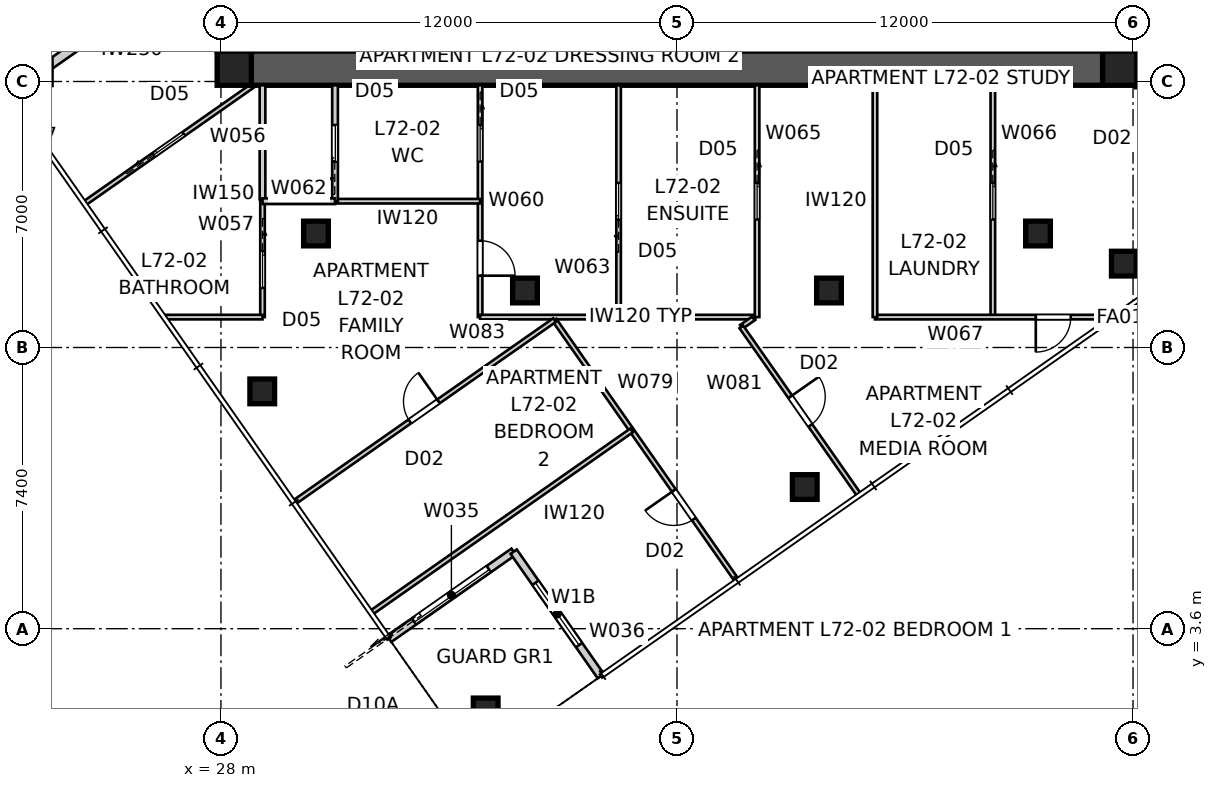
"""IFC4 building model, lengths in metres.
Left out: names, types, materials, properties, quantities, classifications, styles, units other than length and angle.
Written with IfcOpenShell. Run it as: python <this file> out.ifc"""

import sys

from ifc_helpers import new_model, si_unit, direction, frame, frame_2d, origin, origin_2d, place, context, subcontext, project, spatial, polyline, rectangle, outline, extrude, element, fill, save


model = new_model("IFC4")
c1 = context("Model", 3, precision=1e-05, world=origin(), true_north=direction((0.0, 1.0)))
c2 = subcontext(c1, "Body", "Model", "MODEL_VIEW")
j1 = project(units=[si_unit("LENGTHUNIT", "METRE"), si_unit("PLANEANGLEUNIT", "RADIAN")], contexts=[c1])
p1 = place(None, origin())
s1 = spatial("IfcSite", under=j1, at=p1, CompositionType="ELEMENT")
p2 = place(p1, origin())
s2 = spatial("IfcBuilding", under=s1, at=p2, CompositionType="ELEMENT")
p3 = place(p2, frame((0.0, 0.0, 260.8)))
s3 = spatial("IfcBuildingStorey", under=s2, at=p3, CompositionType="ELEMENT", Elevation=260.8)
p4 = place(p3, frame((51.2, 18.35, 0.0), z_axis=(0.0, 0.0, 1.0), x_axis=(-1.0, 0.0, 0.0)))
e1 = element("IfcWall", 1, at=p4, inside=s3, PredefinedType="SHEAR", context=c2, shape_type="SweptSolid", body=[
    extrude(outline(polyline([(0.0, -0.45), (22.4, -0.45), (22.4, -0.025), (22.85, -0.025), (22.85, 0.025), (22.4, 0.025), (22.4, 0.45), (0.0, 0.45), (0.0, 0.025), (-0.45, 0.025), (-0.45, -0.025), (0.0, -0.025), (0.0, -0.45)])), origin(), (0.0, 0.0, 1.0), 3.4),
])
p5 = place(p3, frame((51.65, 18.8, 0.0), z_axis=(0.0, 0.0, 1.0), x_axis=(0.0, 1.0, 0.0)))
e2 = element("IfcWall", 2, at=p5, inside=s3, PredefinedType="SHEAR", context=c2, shape_type="SweptSolid", body=[
    extrude(outline(polyline([(0.0, -0.45), (22.4, -0.45), (22.4, -0.025), (22.85, -0.025), (22.85, 0.025), (22.4, 0.025), (22.4, 0.45), (0.0, 0.45), (0.0, 0.025), (-0.45, 0.025), (-0.45, -0.025), (0.0, -0.025), (0.0, -0.45)])), origin(), (0.0, 0.0, 1.0), 3.4),
])
p6 = place(p5, frame((11.14, 0.0, 0.0)))
e3 = element("IfcOpeningElement", 3, at=p6, cuts=e2, PredefinedType="OPENING", context=c2, shape_type="SweptSolid", body=[
    extrude(rectangle(XDim=1.02, YDim=2.4, at=frame_2d((0.51, 1.2))), frame((0.0, 0.46, 0.0), z_axis=(0.0, -1.0, 0.0), x_axis=(1.0, 0.0, 0.0)), (0.0, 0.0, 1.0), 0.92),
])
p7 = place(p3, frame((28.35, 41.2, 0.0), z_axis=(0.0, 0.0, 1.0), x_axis=(0.0, -1.0, 0.0)))
e4 = element("IfcWall", 4, at=p7, inside=s3, PredefinedType="SHEAR", context=c2, shape_type="SweptSolid", body=[
    extrude(outline(polyline([(0.0, -0.45), (22.4, -0.45), (22.4, -0.025), (22.85, -0.025), (22.85, 0.025), (22.4, 0.025), (22.4, 0.45), (0.0, 0.45), (0.0, 0.025), (-0.45, 0.025), (-0.45, -0.025), (0.0, -0.025), (0.0, -0.45)])), origin(), (0.0, 0.0, 1.0), 3.4),
])
p8 = place(p7, frame((11.14, 0.0, 0.0)))
e5 = element("IfcOpeningElement", 5, at=p8, cuts=e4, PredefinedType="OPENING", context=c2, shape_type="SweptSolid", body=[
    extrude(rectangle(XDim=1.02, YDim=2.4, at=frame_2d((0.51, 1.2))), frame((0.0, 0.46, 0.0), z_axis=(0.0, -1.0, 0.0), x_axis=(1.0, 0.0, 0.0)), (0.0, 0.0, 1.0), 0.92),
])
for number, where, z_axis, x_axis in (
    (6, (28.35, 18.35, 0.0), (0.0, 0.0, 1.0), (1.0, 0.0, 0.0)),
    (7, (51.65, 18.35, 0.0), (0.0, 0.0, 1.0), (1.0, 0.0, 0.0)),
):
    element("IfcColumn", number, at=place(p3, frame(where, z_axis=z_axis, x_axis=x_axis)), inside=s3, PredefinedType="COLUMN", context=c2, shape_type="SweptSolid", body=[
        extrude(rectangle(XDim=0.9, YDim=0.9, at=origin_2d()), origin(), (0.0, 0.0, 1.0), 3.4),
    ])
for number, where, z_axis, x_axis in (
    (8, (34.966, 1.449, 0.0), (0.0, 0.0, 1.0), (1.0, 0.0, 0.0)),
    (9, (43.362, 7.328, 0.0), (0.0, 0.0, 1.0), (1.0, 0.0, 0.0)),
    (10, (51.758, 13.207, 0.0), (0.0, 0.0, 1.0), (1.0, 0.0, 0.0)),
    (11, (29.086, 9.845, 0.0), (0.0, 0.0, 1.0), (1.0, 0.0, 0.0)),
    (12, (30.5, 14.0, 0.0), (0.0, 0.0, 1.0), (1.0, 0.0, 0.0)),
    (13, (36.0, 12.5, 0.0), (0.0, 0.0, 1.0), (1.0, 0.0, 0.0)),
    (14, (44.0, 12.5, 0.0), (0.0, 0.0, 1.0), (1.0, 0.0, 0.0)),
    (15, (49.5, 14.0, 0.0), (0.0, 0.0, 1.0), (1.0, 0.0, 0.0)),
):
    element("IfcColumn", number, at=place(p3, frame(where, z_axis=z_axis, x_axis=x_axis)), inside=s3, PredefinedType="COLUMN", context=c2, shape_type="SweptSolid", body=[
        extrude(rectangle(XDim=0.65, YDim=0.65, at=origin_2d()), origin(), (0.0, 0.0, 1.0), 3.4),
    ])
p9 = place(p3, frame((32.426, 3.333, 0.0), z_axis=(0.0, 0.0, 1.0), x_axis=(0.819165963305, 0.573556557423, 0.0)))
e16 = element("IfcWall", 16, at=p9, inside=s3, PredefinedType="SOLIDWALL", context=c2, shape_type="SweptSolid", body=[
    extrude(rectangle(XDim=4.0, YDim=0.2, at=frame_2d((2.0, 0.0))), origin(), (0.0, 0.0, 1.0), 3.25),
])
p10 = place(p9, frame((0.8, 0.0, 0.0)))
e17 = element("IfcOpeningElement", 17, at=p10, cuts=e16, PredefinedType="OPENING", context=c2, shape_type="SweptSolid", body=[
    extrude(rectangle(XDim=2.4, YDim=2.1, at=frame_2d((1.2, 1.05))), frame((0.0, 0.11, 0.0), z_axis=(0.0, -1.0, 0.0), x_axis=(1.0, 0.0, 0.0)), (0.0, 0.0, 1.0), 0.22),
])
p11 = place(p3, frame((35.702, 5.627, 0.0), z_axis=(0.0, 0.0, 1.0), x_axis=(0.573597512525, -0.819137286189, 0.0)))
e18 = element("IfcWall", 18, at=p11, inside=s3, PredefinedType="SOLIDWALL", context=c2, shape_type="SweptSolid", body=[
    extrude(rectangle(XDim=4.0, YDim=0.2, at=frame_2d((2.0, 0.0))), origin(), (0.0, 0.0, 1.0), 3.25),
])
p12 = place(p11, frame((1.0, 0.0, 0.45)))
e19 = element("IfcOpeningElement", 19, at=p12, cuts=e18, PredefinedType="OPENING", context=c2, shape_type="SweptSolid", body=[
    extrude(rectangle(XDim=2.0, YDim=1.8, at=frame_2d((1.0, 0.9))), frame((0.0, 0.11, 0.0), z_axis=(0.0, -1.0, 0.0), x_axis=(1.0, 0.0, 0.0)), (0.0, 0.0, 1.0), 0.22),
])
p13 = place(p3, frame((22.388, 17.668, 0.0), z_axis=(0.0, 0.0, 1.0), x_axis=(0.819161528122, 0.573562891796, 0.0)))
e20 = element("IfcWall", 20, at=p13, inside=s3, PredefinedType="PARTITIONING", context=c2, shape_type="SweptSolid", body=[
    extrude(rectangle(XDim=6.681, YDim=0.25, at=frame_2d((3.341, 0.0))), origin(), (0.0, 0.0, 1.0), 3.25),
])
p14 = place(p3, frame((24.437, 14.812, 0.0), z_axis=(0.0, 0.0, 1.0), x_axis=(0.819157353031, 0.573568854608, 0.0)))
e21 = element("IfcWall", 21, at=p14, inside=s3, PredefinedType="PARTITIONING", context=c2, shape_type="SweptSolid", body=[
    extrude(rectangle(XDim=5.384, YDim=0.12, at=frame_2d((2.692, 0.0))), origin(), (0.0, 0.0, 1.0), 3.25),
])
p15 = place(p14, frame((2.192, 0.0, 0.0)))
e22 = element("IfcOpeningElement", 22, at=p15, cuts=e21, PredefinedType="OPENING", context=c2, shape_type="SweptSolid", body=[
    extrude(rectangle(XDim=0.96, YDim=2.1, at=frame_2d((0.48, 1.05))), frame((0.0, 0.07, 0.0), z_axis=(0.0, -1.0, 0.0), x_axis=(1.0, 0.0, 0.0)), (0.0, 0.0, 1.0), 0.14),
])
p16 = place(p3, frame((29.094, 14.9, 0.0), z_axis=(0.0, 0.0, 1.0), x_axis=(0.0, -1.0, 0.0)))
e23 = element("IfcWall", 23, at=p16, inside=s3, PredefinedType="PARTITIONING", context=c2, shape_type="SweptSolid", body=[
    extrude(rectangle(XDim=3.1, YDim=0.12, at=frame_2d((1.55, 0.0))), origin(), (0.0, 0.0, 1.0), 3.25),
])
p17 = place(p16, frame((1.37, 0.0, 0.0)))
e24 = element("IfcOpeningElement", 24, at=p17, cuts=e23, PredefinedType="OPENING", context=c2, shape_type="SweptSolid", body=[
    extrude(rectangle(XDim=0.96, YDim=2.1, at=frame_2d((0.48, 1.05))), frame((0.0, 0.07, 0.0), z_axis=(0.0, -1.0, 0.0), x_axis=(1.0, 0.0, 0.0)), (0.0, 0.0, 1.0), 0.14),
])
p18 = place(p3, frame((29.094, 11.8, 0.0), z_axis=(0.0, 0.0, 1.0), x_axis=(-1.0, 0.0, 0.0)))
e25 = element("IfcWall", 25, at=p18, inside=s3, PredefinedType="PARTITIONING", context=c2, shape_type="SweptSolid", body=[
    extrude(rectangle(XDim=2.548, YDim=0.12, at=frame_2d((1.274, 0.0))), origin(), (0.0, 0.0, 1.0), 3.25),
])
p19 = place(p3, frame((29.094, 17.9, 0.0), z_axis=(0.0, 0.0, 1.0), x_axis=(0.0, -1.0, 0.0)))
e26 = element("IfcWall", 26, at=p19, inside=s3, PredefinedType="SOLIDWALL", context=c2, shape_type="SweptSolid", body=[
    extrude(rectangle(XDim=3.0, YDim=0.15, at=frame_2d((1.5, 0.0))), origin(), (0.0, 0.0, 1.0), 3.25),
])
p20 = place(p3, frame((34.819, 17.9, 0.0), z_axis=(0.0, 0.0, 1.0), x_axis=(0.0, -1.0, 0.0)))
e27 = element("IfcWall", 27, at=p20, inside=s3, PredefinedType="PARTITIONING", context=c2, shape_type="SweptSolid", body=[
    extrude(rectangle(XDim=6.1, YDim=0.12, at=frame_2d((3.05, 0.0))), origin(), (0.0, 0.0, 1.0), 3.25),
])
p21 = place(p20, frame((4.09, 0.0, 0.0)))
e28 = element("IfcOpeningElement", 28, at=p21, cuts=e27, PredefinedType="OPENING", context=c2, shape_type="SweptSolid", body=[
    extrude(rectangle(XDim=0.92, YDim=2.34, at=frame_2d((0.46, 1.17))), frame((0.0, 0.07, 0.0), z_axis=(0.0, -1.0, 0.0), x_axis=(1.0, 0.0, 0.0)), (0.0, 0.0, 1.0), 0.14),
])
p22 = place(p20, frame((1.045, 0.0, 0.0)))
e29 = element("IfcOpeningElement", 29, at=p22, cuts=e27, PredefinedType="OPENING", context=c2, shape_type="SweptSolid", body=[
    extrude(rectangle(XDim=0.96, YDim=2.1, at=frame_2d((0.48, 1.05))), frame((0.0, 0.07, 0.0), z_axis=(0.0, -1.0, 0.0), x_axis=(1.0, 0.0, 0.0)), (0.0, 0.0, 1.0), 0.14),
])
p23 = place(p3, frame((34.819, 14.85, 0.0), z_axis=(0.0, 0.0, 1.0), x_axis=(-1.0, 0.0, 0.0)))
e30 = element("IfcWall", 30, at=p23, inside=s3, PredefinedType="PARTITIONING", context=c2, shape_type="SweptSolid", body=[
    extrude(rectangle(XDim=3.817, YDim=0.12, at=frame_2d((1.909, 0.0))), origin(), (0.0, 0.0, 1.0), 3.25),
])
p24 = place(p3, frame((31.002, 14.85, 0.0), z_axis=(0.0, 0.0, 1.0), x_axis=(0.0, 1.0, 0.0)))
e31 = element("IfcWall", 31, at=p24, inside=s3, PredefinedType="SOLIDWALL", context=c2, shape_type="SweptSolid", body=[
    extrude(rectangle(XDim=3.05, YDim=0.15, at=frame_2d((1.525, 0.0))), origin(), (0.0, 0.0, 1.0), 3.25),
])
p25 = place(p24, frame((1.045, 0.0, 0.0)))
e32 = element("IfcOpeningElement", 32, at=p25, cuts=e31, PredefinedType="OPENING", context=c2, shape_type="SweptSolid", body=[
    extrude(rectangle(XDim=0.96, YDim=2.1, at=frame_2d((0.48, 1.05))), frame((0.0, 0.085, 0.0), z_axis=(0.0, -1.0, 0.0), x_axis=(1.0, 0.0, 0.0)), (0.0, 0.0, 1.0), 0.17),
])
p26 = place(p3, frame((38.464, 11.8, 0.0), z_axis=(0.0, 0.0, 1.0), x_axis=(0.0, 1.0, 0.0)))
e33 = element("IfcWall", 33, at=p26, inside=s3, PredefinedType="PARTITIONING", context=c2, shape_type="SweptSolid", body=[
    extrude(rectangle(XDim=6.1, YDim=0.12, at=frame_2d((3.05, 0.0))), origin(), (0.0, 0.0, 1.0), 3.25),
])
p27 = place(p26, frame((2.57, 0.0, 0.0)))
e34 = element("IfcOpeningElement", 34, at=p27, cuts=e33, PredefinedType="OPENING", context=c2, shape_type="SweptSolid", body=[
    extrude(rectangle(XDim=0.96, YDim=2.1, at=frame_2d((0.48, 1.05))), frame((0.0, 0.07, 0.0), z_axis=(0.0, -1.0, 0.0), x_axis=(1.0, 0.0, 0.0)), (0.0, 0.0, 1.0), 0.14),
])
p28 = place(p3, frame((42.062, 11.8, 0.0), z_axis=(0.0, 0.0, 1.0), x_axis=(-1.0, 0.0, 0.0)))
e35 = element("IfcWall", 35, at=p28, inside=s3, PredefinedType="PARTITIONING", context=c2, shape_type="SweptSolid", body=[
    extrude(rectangle(XDim=7.243, YDim=0.12, at=frame_2d((3.621, 0.0))), origin(), (0.0, 0.0, 1.0), 3.25),
])
p29 = place(p3, frame((42.108, 17.9, 0.0), z_axis=(0.0, 0.0, 1.0), x_axis=(0.0, -1.0, 0.0)))
e36 = element("IfcWall", 36, at=p29, inside=s3, PredefinedType="PARTITIONING", context=c2, shape_type="SweptSolid", body=[
    extrude(rectangle(XDim=6.1, YDim=0.12, at=frame_2d((3.05, 0.0))), origin(), (0.0, 0.0, 1.0), 3.25),
])
p30 = place(p29, frame((2.57, 0.0, 0.0)))
e37 = element("IfcOpeningElement", 37, at=p30, cuts=e36, PredefinedType="OPENING", context=c2, shape_type="SweptSolid", body=[
    extrude(rectangle(XDim=0.96, YDim=2.1, at=frame_2d((0.48, 1.05))), frame((0.0, 0.07, 0.0), z_axis=(0.0, -1.0, 0.0), x_axis=(1.0, 0.0, 0.0)), (0.0, 0.0, 1.0), 0.14),
])
p31 = place(p3, frame((48.311, 17.9, 0.0), z_axis=(0.0, 0.0, 1.0), x_axis=(0.0, -1.0, 0.0)))
e38 = element("IfcWall", 38, at=p31, inside=s3, PredefinedType="PARTITIONING", context=c2, shape_type="SweptSolid", body=[
    extrude(rectangle(XDim=6.1, YDim=0.12, at=frame_2d((3.05, 0.0))), origin(), (0.0, 0.0, 1.0), 3.25),
])
p32 = place(p31, frame((2.57, 0.0, 0.0)))
e39 = element("IfcOpeningElement", 39, at=p32, cuts=e38, PredefinedType="OPENING", context=c2, shape_type="SweptSolid", body=[
    extrude(rectangle(XDim=0.96, YDim=2.1, at=frame_2d((0.48, 1.05))), frame((0.0, 0.07, 0.0), z_axis=(0.0, -1.0, 0.0), x_axis=(1.0, 0.0, 0.0)), (0.0, 0.0, 1.0), 0.14),
])
p33 = place(p3, frame((51.422, 11.8, 0.0), z_axis=(0.0, 0.0, 1.0), x_axis=(-1.0, 0.0, 0.0)))
e40 = element("IfcWall", 40, at=p33, inside=s3, PredefinedType="PARTITIONING", context=c2, shape_type="SweptSolid", body=[
    extrude(rectangle(XDim=6.213, YDim=0.12, at=frame_2d((3.106, 0.0))), origin(), (0.0, 0.0, 1.0), 3.25),
])
p34 = place(p33, frame((1.061, 0.0, 0.0)))
e41 = element("IfcOpeningElement", 41, at=p34, cuts=e40, PredefinedType="OPENING", context=c2, shape_type="SweptSolid", body=[
    extrude(rectangle(XDim=0.92, YDim=2.1, at=frame_2d((0.46, 1.05))), frame((0.0, 0.07, 0.0), z_axis=(0.0, -1.0, 0.0), x_axis=(1.0, 0.0, 0.0)), (0.0, 0.0, 1.0), 0.14),
])
p35 = place(p3, frame((45.209, 11.8, 0.0), z_axis=(0.0, 0.0, 1.0), x_axis=(0.0, 1.0, 0.0)))
e42 = element("IfcWall", 42, at=p35, inside=s3, PredefinedType="PARTITIONING", context=c2, shape_type="SweptSolid", body=[
    extrude(rectangle(XDim=6.1, YDim=0.12, at=frame_2d((3.05, 0.0))), origin(), (0.0, 0.0, 1.0), 3.25),
])
p36 = place(p3, frame((52.05, 17.9, 0.0), z_axis=(0.0, 0.0, 1.0), x_axis=(1.0, 0.0, 0.0)))
e43 = element("IfcWall", 43, at=p36, inside=s3, PredefinedType="SOLIDWALL", context=c2, shape_type="SweptSolid", body=[
    extrude(rectangle(XDim=0.444, YDim=0.15, at=frame_2d((0.222, 0.0))), origin(), (0.0, 0.0, 1.0), 3.25),
])
p37 = place(p3, frame((41.558, 4.893, 0.0), z_axis=(0.0, 0.0, 1.0), x_axis=(-0.573576357466, 0.819152099525, 0.0)))
e44 = element("IfcWall", 44, at=p37, inside=s3, PredefinedType="PARTITIONING", context=c2, shape_type="SweptSolid", body=[
    extrude(rectangle(XDim=8.335, YDim=0.12, at=frame_2d((4.167, 0.0))), origin(), (0.0, 0.0, 1.0), 3.25),
])
p38 = place(p37, frame((1.942, 0.0, 0.0)))
e45 = element("IfcOpeningElement", 45, at=p38, cuts=e44, PredefinedType="OPENING", context=c2, shape_type="SweptSolid", body=[
    extrude(rectangle(XDim=0.92, YDim=2.34, at=frame_2d((0.46, 1.17))), frame((0.0, 0.07, 0.0), z_axis=(0.0, -1.0, 0.0), x_axis=(1.0, 0.0, 0.0)), (0.0, 0.0, 1.0), 0.14),
])
p39 = place(p3, frame((42.012, 11.765, 0.0), z_axis=(0.0, 0.0, 1.0), x_axis=(-0.819379381292, -0.573251628444, 0.0)))
e46 = element("IfcWall", 46, at=p39, inside=s3, PredefinedType="PARTITIONING", context=c2, shape_type="SweptSolid", body=[
    extrude(rectangle(XDim=0.389, YDim=0.12, at=frame_2d((0.194, 0.0))), origin(), (0.0, 0.0, 1.0), 3.25),
])
p40 = place(p3, frame((41.693, 11.542, 0.0), z_axis=(0.0, 0.0, 1.0), x_axis=(0.573560001964, -0.819163551525, 0.0)))
e47 = element("IfcWall", 47, at=p40, inside=s3, PredefinedType="PARTITIONING", context=c2, shape_type="SweptSolid", body=[
    extrude(rectangle(XDim=5.369, YDim=0.12, at=frame_2d((2.685, 0.0))), origin(), (0.0, 0.0, 1.0), 3.25),
])
p41 = place(p40, frame((2.244, 0.0, 0.0)))
e48 = element("IfcOpeningElement", 48, at=p41, cuts=e47, PredefinedType="OPENING", context=c2, shape_type="SweptSolid", body=[
    extrude(rectangle(XDim=0.92, YDim=2.34, at=frame_2d((0.46, 1.17))), frame((0.0, 0.07, 0.0), z_axis=(0.0, -1.0, 0.0), x_axis=(1.0, 0.0, 0.0)), (0.0, 0.0, 1.0), 0.14),
])
p42 = place(p3, frame((38.808, 8.82, 0.0), z_axis=(0.0, 0.0, 1.0), x_axis=(-0.819152099525, -0.573576357466, 0.0)))
e49 = element("IfcWall", 49, at=p42, inside=s3, PredefinedType="PARTITIONING", context=c2, shape_type="SweptSolid", body=[
    extrude(rectangle(XDim=8.335, YDim=0.12, at=frame_2d((4.167, 0.0))), origin(), (0.0, 0.0, 1.0), 3.25),
])
p43 = place(p3, frame((29.949, 6.94, 0.0), z_axis=(0.0, 0.0, 1.0), x_axis=(0.819152099525, 0.573576357466, 0.0)))
e50 = element("IfcWall", 50, at=p43, inside=s3, PredefinedType="PARTITIONING", context=c2, shape_type="SweptSolid", body=[
    extrude(rectangle(XDim=8.335, YDim=0.12, at=frame_2d((4.167, 0.0))), origin(), (0.0, 0.0, 1.0), 3.25),
])
p44 = place(p43, frame((3.688, 0.0, 0.0)))
e51 = element("IfcOpeningElement", 51, at=p44, cuts=e50, PredefinedType="OPENING", context=c2, shape_type="SweptSolid", body=[
    extrude(rectangle(XDim=0.92, YDim=2.34, at=frame_2d((0.46, 1.17))), frame((0.0, 0.07, 0.0), z_axis=(0.0, -1.0, 0.0), x_axis=(1.0, 0.0, 0.0)), (0.0, 0.0, 1.0), 0.14),
])
p45 = place(p3, frame((29.094, 14.85, 0.0), z_axis=(0.0, 0.0, 1.0), x_axis=(1.0, 0.0, 0.0)))
e52 = element("IfcWall", 52, at=p45, inside=s3, PredefinedType="SOLIDWALL", context=c2, shape_type="SweptSolid", body=[
    extrude(rectangle(XDim=1.909, YDim=0.15, at=frame_2d((0.954, 0.0))), origin(), (0.0, 0.0, 1.0), 3.25),
])
p46 = place(p10, origin())
e53 = element("IfcDoor", 53, at=p46, inside=s3, OperationType="SLIDING_TO_LEFT", PredefinedType="DOOR", context=c2, shape_type="SweptSolid", body=[
    extrude(rectangle(XDim=2.4, YDim=2.1, at=frame_2d((1.2, 1.05))), frame((0.0, 0.025, 0.0), z_axis=(0.0, -1.0, 0.0), x_axis=(1.0, 0.0, 0.0)), (0.0, 0.0, 1.0), 0.05),
])
fill(e17, e53)
p47 = place(p12, origin())
e54 = element("IfcWindow", 54, at=p47, inside=s3, PartitioningType="SINGLE_PANEL", PredefinedType="WINDOW", context=c2, shape_type="SweptSolid", body=[
    extrude(rectangle(XDim=2.0, YDim=1.8, at=frame_2d((1.0, 0.9))), frame((0.0, 0.03, 0.0), z_axis=(0.0, -1.0, 0.0), x_axis=(1.0, 0.0, 0.0)), (0.0, 0.0, 1.0), 0.06),
])
fill(e19, e54)
p48 = place(p32, origin())
e55 = element("IfcDoor", 55, at=p48, inside=s3, OperationType="SLIDING_TO_LEFT", PredefinedType="DOOR", context=c2, shape_type="SweptSolid", body=[
    extrude(rectangle(XDim=0.96, YDim=2.1, at=frame_2d((0.48, 1.05))), frame((0.0, 0.025, 0.0), z_axis=(0.0, -1.0, 0.0), x_axis=(1.0, 0.0, 0.0)), (0.0, 0.0, 1.0), 0.05),
])
fill(e39, e55)
p49 = place(p34, origin())
e56 = element("IfcDoor", 56, at=p49, inside=s3, OperationType="SINGLE_SWING_RIGHT", PredefinedType="DOOR", context=c2, shape_type="SweptSolid", body=[
    extrude(rectangle(XDim=0.92, YDim=2.1, at=frame_2d((0.46, 1.05))), frame((0.0, 0.025, 0.0), z_axis=(0.0, -1.0, 0.0), x_axis=(1.0, 0.0, 0.0)), (0.0, 0.0, 1.0), 0.05),
])
fill(e41, e56)
p50 = place(p30, origin())
e57 = element("IfcDoor", 57, at=p50, inside=s3, OperationType="SLIDING_TO_LEFT", PredefinedType="DOOR", context=c2, shape_type="SweptSolid", body=[
    extrude(rectangle(XDim=0.96, YDim=2.1, at=frame_2d((0.48, 1.05))), frame((0.0, 0.025, 0.0), z_axis=(0.0, -1.0, 0.0), x_axis=(1.0, 0.0, 0.0)), (0.0, 0.0, 1.0), 0.05),
])
fill(e37, e57)
p51 = place(p41, origin())
e58 = element("IfcDoor", 58, at=p51, inside=s3, OperationType="SINGLE_SWING_LEFT", PredefinedType="DOOR", context=c2, shape_type="SweptSolid", body=[
    extrude(rectangle(XDim=0.92, YDim=2.34, at=frame_2d((0.46, 1.17))), frame((0.0, 0.025, 0.0), z_axis=(0.0, -1.0, 0.0), x_axis=(1.0, 0.0, 0.0)), (0.0, 0.0, 1.0), 0.05),
])
fill(e48, e58)
p52 = place(p27, origin())
e59 = element("IfcDoor", 59, at=p52, inside=s3, OperationType="SLIDING_TO_LEFT", PredefinedType="DOOR", context=c2, shape_type="SweptSolid", body=[
    extrude(rectangle(XDim=0.96, YDim=2.1, at=frame_2d((0.48, 1.05))), frame((0.0, 0.025, 0.0), z_axis=(0.0, -1.0, 0.0), x_axis=(1.0, 0.0, 0.0)), (0.0, 0.0, 1.0), 0.05),
])
fill(e34, e59)
p53 = place(p21, origin())
e60 = element("IfcDoor", 60, at=p53, inside=s3, OperationType="SINGLE_SWING_RIGHT", PredefinedType="DOOR", context=c2, shape_type="SweptSolid", body=[
    extrude(rectangle(XDim=0.92, YDim=2.34, at=frame_2d((0.46, 1.17))), frame((0.0, 0.025, 0.0), z_axis=(0.0, -1.0, 0.0), x_axis=(1.0, 0.0, 0.0)), (0.0, 0.0, 1.0), 0.05),
])
fill(e28, e60)
p54 = place(p22, origin())
e61 = element("IfcDoor", 61, at=p54, inside=s3, OperationType="SLIDING_TO_LEFT", PredefinedType="DOOR", context=c2, shape_type="SweptSolid", body=[
    extrude(rectangle(XDim=0.96, YDim=2.1, at=frame_2d((0.48, 1.05))), frame((0.0, 0.025, 0.0), z_axis=(0.0, -1.0, 0.0), x_axis=(1.0, 0.0, 0.0)), (0.0, 0.0, 1.0), 0.05),
])
fill(e29, e61)
p55 = place(p44, origin())
e62 = element("IfcDoor", 62, at=p55, inside=s3, OperationType="SINGLE_SWING_RIGHT", PredefinedType="DOOR", context=c2, shape_type="SweptSolid", body=[
    extrude(rectangle(XDim=0.92, YDim=2.34, at=frame_2d((0.46, 1.17))), frame((0.0, 0.025, 0.0), z_axis=(0.0, -1.0, 0.0), x_axis=(1.0, 0.0, 0.0)), (0.0, 0.0, 1.0), 0.05),
])
fill(e51, e62)
p56 = place(p17, origin())
e63 = element("IfcDoor", 63, at=p56, inside=s3, OperationType="SLIDING_TO_LEFT", PredefinedType="DOOR", context=c2, shape_type="SweptSolid", body=[
    extrude(rectangle(XDim=0.96, YDim=2.1, at=frame_2d((0.48, 1.05))), frame((0.0, 0.025, 0.0), z_axis=(0.0, -1.0, 0.0), x_axis=(1.0, 0.0, 0.0)), (0.0, 0.0, 1.0), 0.05),
])
fill(e24, e63)
p57 = place(p25, origin())
e64 = element("IfcDoor", 64, at=p57, inside=s3, OperationType="SLIDING_TO_LEFT", PredefinedType="DOOR", context=c2, shape_type="SweptSolid", body=[
    extrude(rectangle(XDim=0.96, YDim=2.1, at=frame_2d((0.48, 1.05))), frame((0.0, 0.025, 0.0), z_axis=(0.0, -1.0, 0.0), x_axis=(1.0, 0.0, 0.0)), (0.0, 0.0, 1.0), 0.05),
])
fill(e32, e64)
p58 = place(p15, origin())
e65 = element("IfcDoor", 65, at=p58, inside=s3, OperationType="SLIDING_TO_LEFT", PredefinedType="DOOR", context=c2, shape_type="SweptSolid", body=[
    extrude(rectangle(XDim=0.96, YDim=2.1, at=frame_2d((0.48, 1.05))), frame((0.0, 0.025, 0.0), z_axis=(0.0, -1.0, 0.0), x_axis=(1.0, 0.0, 0.0)), (0.0, 0.0, 1.0), 0.05),
])
fill(e22, e65)
p59 = place(p38, origin())
e66 = element("IfcDoor", 66, at=p59, inside=s3, OperationType="SINGLE_SWING_RIGHT", PredefinedType="DOOR", context=c2, shape_type="SweptSolid", body=[
    extrude(rectangle(XDim=0.92, YDim=2.34, at=frame_2d((0.46, 1.17))), frame((0.0, 0.025, 0.0), z_axis=(0.0, -1.0, 0.0), x_axis=(1.0, 0.0, 0.0)), (0.0, 0.0, 1.0), 0.05),
])
fill(e45, e66)
save(model, sys.argv[1])
